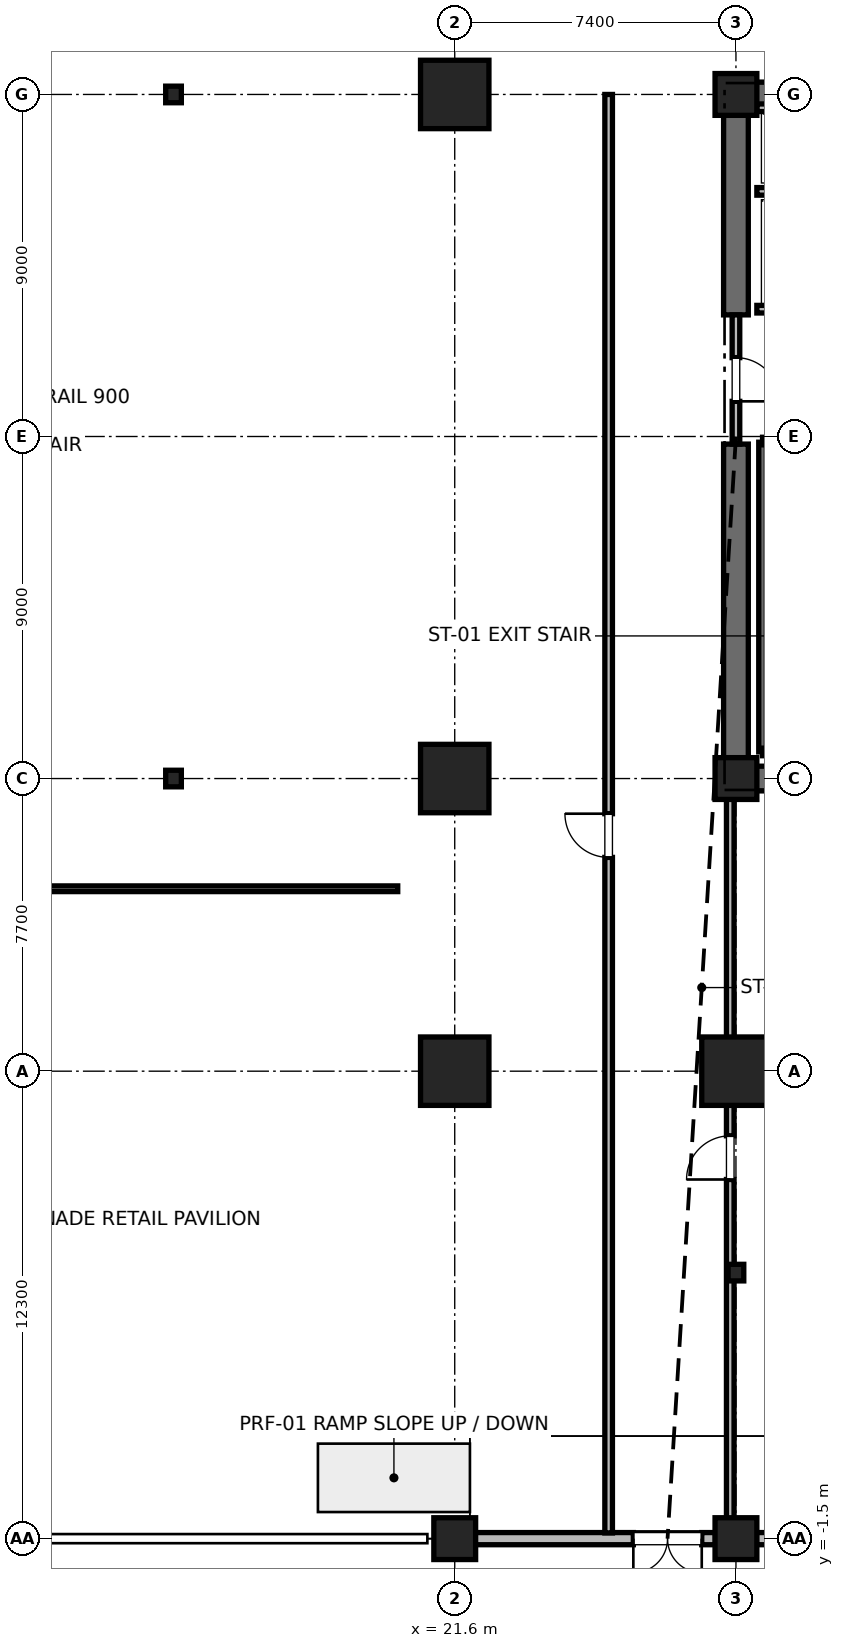
"""IFC4 building model, lengths in metres.
Left out: names, types, materials, properties, quantities, classifications, styles, units other than length and angle.
Written with IfcOpenShell. Run it as: python <this file> out.ifc"""

import sys

from ifc_helpers import new_model, si_unit, direction, frame, frame_2d, origin, origin_2d, place, context, subcontext, project, spatial, rectangle, i_section, extrude, element, fill, save


model = new_model("IFC4")
c1 = context("Model", 3, precision=1e-05, world=origin(), true_north=direction((0.0, 1.0)))
c2 = subcontext(c1, "Body", "Model", "MODEL_VIEW")
j1 = project(units=[si_unit("LENGTHUNIT", "METRE"), si_unit("PLANEANGLEUNIT", "RADIAN")], contexts=[c1])
p1 = place(None, origin())
s1 = spatial("IfcSite", under=j1, at=p1, CompositionType="ELEMENT")
p2 = place(p1, origin())
s2 = spatial("IfcBuilding", under=s1, at=p2, CompositionType="ELEMENT")
p3 = place(p2, origin())
s3 = spatial("IfcBuildingStorey", under=s2, at=p3, CompositionType="ELEMENT", Elevation=0.0)
for number, where, z_axis, x_axis in (
    (1, (29.0, 10.8, 0.0), (0.0, 0.0, 1.0), (1.0, 0.0, 0.0)),
    (2, (21.6, 18.5, 0.0), (0.0, 0.0, 1.0), (1.0, 0.0, 0.0)),
    (3, (21.6, 36.5, 0.0), (0.0, 0.0, 1.0), (1.0, 0.0, 0.0)),
    (4, (21.6, 10.8, 0.0), (0.0, 0.0, 1.0), (1.0, 0.0, 0.0)),
):
    element("IfcColumn", number, at=place(p3, frame(where, z_axis=z_axis, x_axis=x_axis)), inside=s3, PredefinedType="COLUMN", context=c2, shape_type="SweptSolid", body=[
        extrude(rectangle(XDim=1.8, YDim=1.8, at=origin_2d()), origin(), (0.0, 0.0, 1.0), 6.0),
    ])
for number, where, z_axis, x_axis in (
    (5, (14.2, 18.5, 0.0), (0.0, 0.0, 1.0), (1.0, 0.0, 0.0)),
    (6, (14.2, 36.5, 0.0), (0.0, 0.0, 1.0), (1.0, 0.0, 0.0)),
    (7, (29.0, 5.5, 0.0), (0.0, 0.0, 1.0), (1.0, 0.0, 0.0)),
):
    element("IfcColumn", number, at=place(p3, frame(where, z_axis=z_axis, x_axis=x_axis)), inside=s3, PredefinedType="COLUMN", context=c2, shape_type="SweptSolid", body=[
        extrude(i_section(OverallWidth=0.412, OverallDepth=0.437, WebThickness=0.036, FlangeThickness=0.058, FilletRadius=0.015, at=origin_2d()), origin(), (0.0, 0.0, 1.0), 6.0),
    ])
for number, where, z_axis, x_axis in (
    (8, (29.0, 18.5, 0.0), (0.0, 0.0, 1.0), (1.0, 0.0, 0.0)),
    (9, (29.0, 36.5, 0.0), (0.0, 0.0, 1.0), (1.0, 0.0, 0.0)),
):
    element("IfcColumn", number, at=place(p3, frame(where, z_axis=z_axis, x_axis=x_axis)), inside=s3, PredefinedType="PILASTER", context=c2, shape_type="SweptSolid", body=[
        extrude(rectangle(XDim=1.1, YDim=1.1, at=origin_2d()), origin(), (0.0, 0.0, 1.0), 6.0),
    ])
for number, where, z_axis, x_axis in (
    (10, (21.6, -1.5, 0.0), (0.0, 0.0, 1.0), (1.0, 0.0, 0.0)),
    (11, (29.0, -1.5, 0.0), (0.0, 0.0, 1.0), (1.0, 0.0, 0.0)),
):
    element("IfcColumn", number, at=place(p3, frame(where, z_axis=z_axis, x_axis=x_axis)), inside=s3, PredefinedType="COLUMN", context=c2, shape_type="SweptSolid", body=[
        extrude(rectangle(XDim=1.1, YDim=1.1, at=origin_2d()), origin(), (0.0, 0.0, 1.0), 6.0),
    ])
p4 = place(p3, frame((29.0, 18.5, 0.0), z_axis=(0.0, 0.0, 1.0), x_axis=(1.0, 0.0, 0.0)))
e12 = element("IfcWall", 12, at=p4, inside=s3, PredefinedType="SHEAR", context=c2, shape_type="SweptSolid", body=[
    extrude(rectangle(XDim=9.2, YDim=0.65, at=frame_2d((4.6, 0.0))), origin(), (0.0, 0.0, 1.0), 5.72),
])
p5 = place(p3, frame((29.0, 36.5, 0.0), z_axis=(0.0, 0.0, 1.0), x_axis=(1.0, 0.0, 0.0)))
e13 = element("IfcWall", 13, at=p5, inside=s3, PredefinedType="SHEAR", context=c2, shape_type="SweptSolid", body=[
    extrude(rectangle(XDim=5.8, YDim=0.65, at=frame_2d((2.9, 0.0))), origin(), (0.0, 0.0, 1.0), 5.72),
])
p6 = place(p3, frame((29.0, 18.5, 0.0), z_axis=(0.0, 0.0, 1.0), x_axis=(0.0, 1.0, 0.0)))
e14 = element("IfcWall", 14, at=p6, inside=s3, PredefinedType="SHEAR", context=c2, shape_type="SweptSolid", body=[
    extrude(rectangle(XDim=8.8, YDim=0.65, at=frame_2d((4.4, 0.0))), origin(), (0.0, 0.0, 1.0), 5.72),
])
p7 = place(p3, frame((29.0, 30.7, 0.0), z_axis=(0.0, 0.0, 1.0), x_axis=(0.0, 1.0, 0.0)))
e15 = element("IfcWall", 15, at=p7, inside=s3, PredefinedType="SHEAR", context=c2, shape_type="SweptSolid", body=[
    extrude(rectangle(XDim=5.8, YDim=0.65, at=frame_2d((2.9, 0.0))), origin(), (0.0, 0.0, 1.0), 5.72),
])
p8 = place(p3, frame((28.46, -1.5, 0.0), z_axis=(0.0, 0.0, 1.0), x_axis=(-1.0, 0.0, 0.0)))
e16 = element("IfcWall", 16, at=p8, inside=s3, PredefinedType="SOLIDWALL", context=c2, shape_type="SweptSolid", body=[
    extrude(rectangle(XDim=6.32, YDim=0.32, at=frame_2d((3.16, 0.0))), origin(), (0.0, 0.0, 1.0), 4.33),
])
p9 = place(p8, frame((0.36, 0.0, 0.0)))
e17 = element("IfcOpeningElement", 17, at=p9, cuts=e16, PredefinedType="OPENING", context=c2, shape_type="SweptSolid", body=[
    extrude(rectangle(XDim=1.8, YDim=2.4, at=frame_2d((0.9, 1.2))), frame((0.0, 0.16, 0.0), z_axis=(0.0, -1.0, 0.0), x_axis=(1.0, 0.0, 0.0)), (0.0, 0.0, 1.0), 0.32),
])
p10 = place(p3, frame((29.54, -1.5, 0.0), z_axis=(0.0, 0.0, 1.0), x_axis=(1.0, 0.0, 0.0)))
e18 = element("IfcWall", 18, at=p10, inside=s3, PredefinedType="SOLIDWALL", context=c2, shape_type="SweptSolid", body=[
    extrude(rectangle(XDim=20.92, YDim=0.32, at=frame_2d((10.46, 0.0))), origin(), (0.0, 0.0, 1.0), 4.33),
])
p11 = place(p10, frame((3.38, 0.0, 0.0)))
e19 = element("IfcOpeningElement", 19, at=p11, cuts=e18, PredefinedType="OPENING", context=c2, shape_type="SweptSolid", body=[
    extrude(rectangle(XDim=2.4, YDim=2.8, at=frame_2d((1.2, 1.4))), frame((0.0, 0.16, 0.0), z_axis=(0.0, -1.0, 0.0), x_axis=(1.0, 0.0, 0.0)), (0.0, 0.0, 1.0), 0.32),
])
p12 = place(p10, frame((9.28, 0.0, 0.9)))
e20 = element("IfcOpeningElement", 20, at=p12, cuts=e18, PredefinedType="OPENING", context=c2, shape_type="SweptSolid", body=[
    extrude(rectangle(XDim=2.4, YDim=2.4, at=frame_2d((1.2, 1.2))), frame((0.0, 0.16, 0.0), z_axis=(0.0, -1.0, 0.0), x_axis=(1.0, 0.0, 0.0)), (0.0, 0.0, 1.0), 0.32),
])
p13 = place(p10, frame((15.18, 0.0, 0.0)))
e21 = element("IfcOpeningElement", 21, at=p13, cuts=e18, PredefinedType="OPENING", context=c2, shape_type="SweptSolid", body=[
    extrude(rectangle(XDim=2.4, YDim=2.8, at=frame_2d((1.2, 1.4))), frame((0.0, 0.16, 0.0), z_axis=(0.0, -1.0, 0.0), x_axis=(1.0, 0.0, 0.0)), (0.0, 0.0, 1.0), 0.32),
])
p14 = place(p3, frame((29.7, 19.2, 0.0), z_axis=(0.0, 0.0, 1.0), x_axis=(0.0, 1.0, 0.0)))
e22 = element("IfcWall", 22, at=p14, inside=s3, PredefinedType="SOLIDWALL", context=c2, shape_type="SweptSolid", body=[
    extrude(rectangle(XDim=8.15, YDim=0.2, at=frame_2d((4.075, 0.0))), origin(), (0.0, 0.0, 1.0), 5.72),
])
p15 = place(p3, frame((29.7, 19.2, 0.0), z_axis=(0.0, 0.0, 1.0), x_axis=(1.0, 0.0, 0.0)))
e23 = element("IfcWall", 23, at=p15, inside=s3, PredefinedType="SOLIDWALL", context=c2, shape_type="SweptSolid", body=[
    extrude(rectangle(XDim=3.12, YDim=0.2, at=frame_2d((1.56, 0.0))), origin(), (0.0, 0.0, 1.0), 5.72),
])
p16 = place(p3, frame((29.7, 27.38, 0.0), z_axis=(0.0, 0.0, 1.0), x_axis=(1.0, 0.0, 0.0)))
e24 = element("IfcWall", 24, at=p16, inside=s3, PredefinedType="SOLIDWALL", context=c2, shape_type="SweptSolid", body=[
    extrude(rectangle(XDim=3.12, YDim=0.2, at=frame_2d((1.56, 0.0))), origin(), (0.0, 0.0, 1.0), 5.72),
])
p17 = place(p16, frame((1.01, 0.0, 0.0)))
e25 = element("IfcOpeningElement", 25, at=p17, cuts=e24, PredefinedType="OPENING", context=c2, shape_type="SweptSolid", body=[
    extrude(rectangle(XDim=1.1, YDim=2.15, at=frame_2d((0.55, 1.075))), frame((0.0, 0.1, 0.0), z_axis=(0.0, -1.0, 0.0), x_axis=(1.0, 0.0, 0.0)), (0.0, 0.0, 1.0), 0.2),
])
p18 = place(p3, frame((29.0, 30.7, 0.0), z_axis=(0.0, 0.0, 1.0), x_axis=(0.0, -1.0, 0.0)))
e26 = element("IfcWall", 26, at=p18, inside=s3, PredefinedType="PARTITIONING", context=c2, shape_type="SweptSolid", body=[
    extrude(rectangle(XDim=3.4, YDim=0.2, at=frame_2d((1.7, 0.0))), origin(), (0.0, 0.0, 1.0), 4.5),
])
p19 = place(p18, frame((1.125, 0.0, 0.0)))
e27 = element("IfcOpeningElement", 27, at=p19, cuts=e26, PredefinedType="OPENING", context=c2, shape_type="SweptSolid", body=[
    extrude(rectangle(XDim=1.15, YDim=2.2, at=frame_2d((0.575, 1.1))), frame((0.0, 0.1, 0.0), z_axis=(0.0, -1.0, 0.0), x_axis=(1.0, 0.0, 0.0)), (0.0, 0.0, 1.0), 0.2),
])
p20 = place(p3, frame((29.55, 30.85, 0.0), z_axis=(0.0, 0.0, 1.0), x_axis=(1.0, 0.0, 0.0)))
e28 = element("IfcWall", 28, at=p20, inside=s3, PredefinedType="SOLIDWALL", context=c2, shape_type="SweptSolid", body=[
    extrude(rectangle(XDim=2.6, YDim=0.2, at=frame_2d((1.3, 0.0))), origin(), (0.0, 0.0, 1.0), 4.5),
])
p21 = place(p20, frame((0.75, 0.0, 0.0)))
e29 = element("IfcOpeningElement", 29, at=p21, cuts=e28, PredefinedType="OPENING", context=c2, shape_type="SweptSolid", body=[
    extrude(rectangle(XDim=1.1, YDim=2.2, at=frame_2d((0.55, 1.1))), frame((0.0, 0.1, 0.0), z_axis=(0.0, -1.0, 0.0), x_axis=(1.0, 0.0, 0.0)), (0.0, 0.0, 1.0), 0.2),
])
p22 = place(p3, frame((29.55, 33.95, 0.0), z_axis=(0.0, 0.0, 1.0), x_axis=(1.0, 0.0, 0.0)))
e30 = element("IfcWall", 30, at=p22, inside=s3, PredefinedType="SOLIDWALL", context=c2, shape_type="SweptSolid", body=[
    extrude(rectangle(XDim=2.8, YDim=0.2, at=frame_2d((1.4, 0.0))), origin(), (0.0, 0.0, 1.0), 5.72),
])
p23 = place(p3, frame((32.35, 36.15, 0.0), z_axis=(0.0, 0.0, 1.0), x_axis=(-1.0, 0.0, 0.0)))
e31 = element("IfcWall", 31, at=p23, inside=s3, PredefinedType="SOLIDWALL", context=c2, shape_type="SweptSolid", body=[
    extrude(rectangle(XDim=2.8, YDim=0.2, at=frame_2d((1.4, 0.0))), origin(), (0.0, 0.0, 1.0), 4.779),
])
p24 = place(p3, frame((28.85, -1.35, 0.0), z_axis=(0.0, 0.0, 1.0), x_axis=(0.0, 1.0, 0.0)))
e32 = element("IfcWall", 32, at=p24, inside=s3, PredefinedType="PARTITIONING", context=c2, shape_type="SweptSolid", body=[
    extrude(rectangle(XDim=19.75, YDim=0.2, at=frame_2d((9.875, 0.0))), origin(), (0.0, 0.0, 1.0), 2.85),
])
p25 = place(p24, frame((9.3, 0.0, 0.0)))
e33 = element("IfcOpeningElement", 33, at=p25, cuts=e32, PredefinedType="OPENING", context=c2, shape_type="SweptSolid", body=[
    extrude(rectangle(XDim=1.15, YDim=2.2, at=frame_2d((0.575, 1.1))), frame((0.0, 0.1, 0.0), z_axis=(0.0, -1.0, 0.0), x_axis=(1.0, 0.0, 0.0)), (0.0, 0.0, 1.0), 0.2),
])
p26 = place(p3, frame((25.65, -1.35, 0.0), z_axis=(0.0, 0.0, 1.0), x_axis=(0.0, 1.0, 0.0)))
e34 = element("IfcWall", 34, at=p26, inside=s3, PredefinedType="PARTITIONING", context=c2, shape_type="SweptSolid", body=[
    extrude(rectangle(XDim=37.85, YDim=0.2, at=frame_2d((18.925, 0.0))), origin(), (0.0, 0.0, 1.0), 2.85),
])
p27 = place(p26, frame((17.775, 0.0, 0.0)))
e35 = element("IfcOpeningElement", 35, at=p27, cuts=e34, PredefinedType="OPENING", context=c2, shape_type="SweptSolid", body=[
    extrude(rectangle(XDim=1.15, YDim=2.2, at=frame_2d((0.575, 1.1))), frame((0.0, 0.1, 0.0), z_axis=(0.0, -1.0, 0.0), x_axis=(1.0, 0.0, 0.0)), (0.0, 0.0, 1.0), 0.2),
])
p28 = place(p3, frame((-1.85, 15.6, 0.0), z_axis=(0.0, 0.0, 1.0), x_axis=(1.0, 0.0, 0.0)))
e36 = element("IfcWall", 36, at=p28, inside=s3, PredefinedType="PARTITIONING", context=c2, shape_type="SweptSolid", body=[
    extrude(rectangle(XDim=21.95, YDim=0.15, at=frame_2d((10.975, 0.0))), origin(), (0.0, 0.0, 1.0), 2.85),
])
p29 = place(p28, frame((10.475, 0.0, 0.0)))
e37 = element("IfcOpeningElement", 37, at=p29, cuts=e36, PredefinedType="OPENING", context=c2, shape_type="SweptSolid", body=[
    extrude(rectangle(XDim=1.0, YDim=2.15, at=frame_2d((0.5, 1.075))), frame((0.0, 0.075, 0.0), z_axis=(0.0, -1.0, 0.0), x_axis=(1.0, 0.0, 0.0)), (0.0, 0.0, 1.0), 0.15),
])
p30 = place(p9, origin())
e38 = element("IfcDoor", 38, at=p30, inside=s3, OperationType="DOUBLE_DOOR_SINGLE_SWING", PredefinedType="DOOR", context=c2, shape_type="SweptSolid", body=[
    extrude(rectangle(XDim=1.8, YDim=2.4, at=frame_2d((0.9, 1.2))), frame((0.0, 0.025, 0.0), z_axis=(0.0, -1.0, 0.0), x_axis=(1.0, 0.0, 0.0)), (0.0, 0.0, 1.0), 0.05),
])
fill(e17, e38)
p31 = place(p19, origin())
e39 = element("IfcDoor", 39, at=p31, inside=s3, OperationType="SINGLE_SWING_RIGHT", PredefinedType="DOOR", context=c2, shape_type="SweptSolid", body=[
    extrude(rectangle(XDim=1.15, YDim=2.2, at=frame_2d((0.575, 1.1))), frame((0.0, 0.025, 0.0), z_axis=(0.0, -1.0, 0.0), x_axis=(1.0, 0.0, 0.0)), (0.0, 0.0, 1.0), 0.05),
])
fill(e27, e39)
p32 = place(p25, origin())
e40 = element("IfcDoor", 40, at=p32, inside=s3, OperationType="SINGLE_SWING_LEFT", PredefinedType="DOOR", context=c2, shape_type="SweptSolid", body=[
    extrude(rectangle(XDim=1.15, YDim=2.2, at=frame_2d((0.575, 1.1))), frame((0.0, 0.025, 0.0), z_axis=(0.0, -1.0, 0.0), x_axis=(1.0, 0.0, 0.0)), (0.0, 0.0, 1.0), 0.05),
])
fill(e33, e40)
p33 = place(p27, origin())
e41 = element("IfcDoor", 41, at=p33, inside=s3, OperationType="SINGLE_SWING_RIGHT", PredefinedType="DOOR", context=c2, shape_type="SweptSolid", body=[
    extrude(rectangle(XDim=1.15, YDim=2.2, at=frame_2d((0.575, 1.1))), frame((0.0, 0.025, 0.0), z_axis=(0.0, -1.0, 0.0), x_axis=(1.0, 0.0, 0.0)), (0.0, 0.0, 1.0), 0.05),
])
fill(e35, e41)
save(model, sys.argv[1])
